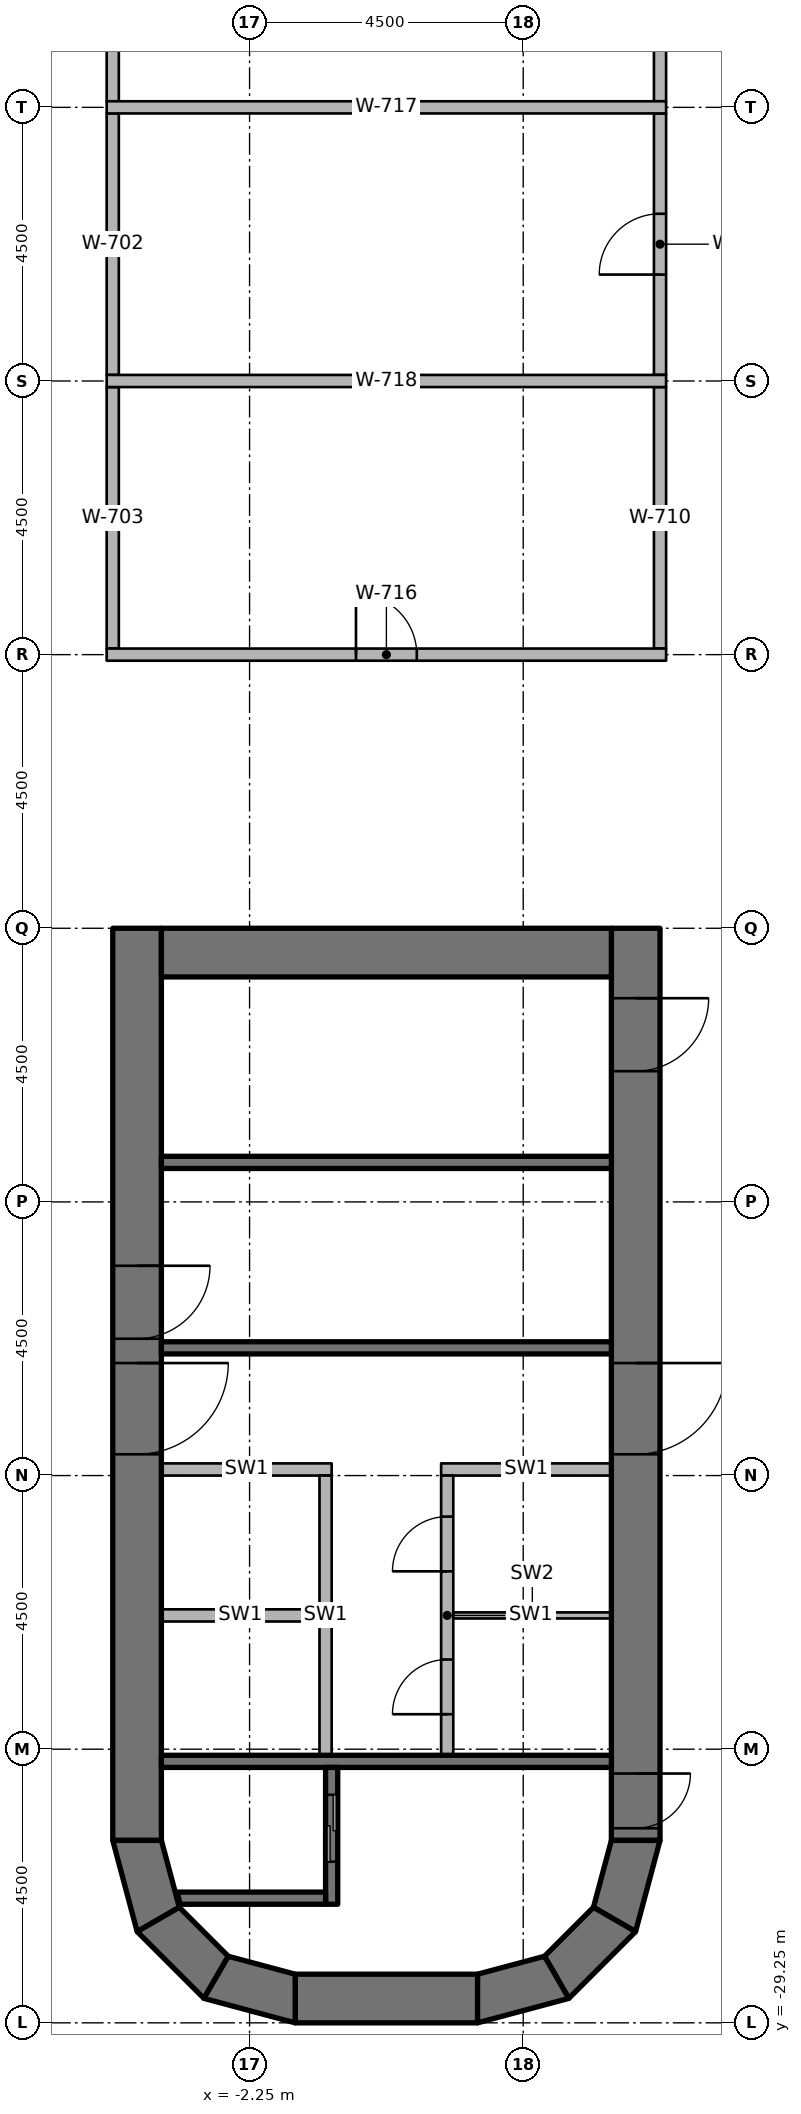
"""IFC4 building model, lengths in metres.
Left out: names, types, materials, properties, quantities, classifications, styles, units other than length and angle.
Written with IfcOpenShell. Run it as: python <this file> out.ifc"""

import sys

from ifc_helpers import new_model, si_unit, direction, frame, frame_2d, origin, place, context, subcontext, project, spatial, polyline, rectangle, outline, extrude, element, fill, save


model = new_model("IFC4")
c1 = context("Model", 3, precision=1e-05, world=origin(), true_north=direction((0.0, 1.0)))
c2 = subcontext(c1, "Body", "Model", "MODEL_VIEW")
j1 = project(units=[si_unit("LENGTHUNIT", "METRE"), si_unit("PLANEANGLEUNIT", "RADIAN")], contexts=[c1])
p1 = place(None, origin())
s1 = spatial("IfcSite", under=j1, at=p1, CompositionType="ELEMENT")
p2 = place(p1, origin())
s2 = spatial("IfcBuilding", under=s1, at=p2, CompositionType="ELEMENT")
p3 = place(p2, frame((0.0, 0.0, 94.2)))
s3 = spatial("IfcBuildingStorey", under=s2, at=p3, CompositionType="ELEMENT", Elevation=94.2)
p4 = place(p3, frame((-4.1, -11.25, 0.0), z_axis=(0.0, 0.0, 1.0), x_axis=(0.0, -1.0, 0.0)))
e1 = element("IfcWall", 1, at=p4, inside=s3, PredefinedType="SHEAR", context=c2, shape_type="SweptSolid", body=[
    extrude(rectangle(XDim=15.0, YDim=0.8, at=frame_2d((7.5, 0.0))), origin(), (0.0, 0.0, 1.0), 3.8),
])
p5 = place(p4, frame((7.15, 0.0, 0.0)))
e2 = element("IfcOpeningElement", 2, at=p5, cuts=e1, PredefinedType="OPENING", context=c2, shape_type="SweptSolid", body=[
    extrude(rectangle(XDim=1.5, YDim=2.3, at=frame_2d((0.75, 1.15))), frame((0.0, 0.41, 0.0), z_axis=(0.0, -1.0, 0.0), x_axis=(1.0, 0.0, 0.0)), (0.0, 0.0, 1.0), 0.82),
])
p6 = place(p4, frame((5.55, 0.0, 0.0)))
e3 = element("IfcOpeningElement", 3, at=p6, cuts=e1, PredefinedType="OPENING", context=c2, shape_type="SweptSolid", body=[
    extrude(rectangle(XDim=1.2, YDim=2.1, at=frame_2d((0.6, 1.05))), frame((0.0, 0.41, 0.0), z_axis=(0.0, -1.0, 0.0), x_axis=(1.0, 0.0, 0.0)), (0.0, 0.0, 1.0), 0.82),
])
p7 = place(p3, frame((4.1, -11.25, 0.0), z_axis=(0.0, 0.0, 1.0), x_axis=(0.0, -1.0, 0.0)))
e4 = element("IfcWall", 4, at=p7, inside=s3, PredefinedType="SHEAR", context=c2, shape_type="SweptSolid", body=[
    extrude(rectangle(XDim=15.0, YDim=0.8, at=frame_2d((7.5, 0.0))), origin(), (0.0, 0.0, 1.0), 3.8),
])
p8 = place(p7, frame((7.15, 0.0, 0.0)))
e5 = element("IfcOpeningElement", 5, at=p8, cuts=e4, PredefinedType="OPENING", context=c2, shape_type="SweptSolid", body=[
    extrude(rectangle(XDim=1.5, YDim=2.3, at=frame_2d((0.75, 1.15))), frame((0.0, 0.41, 0.0), z_axis=(0.0, -1.0, 0.0), x_axis=(1.0, 0.0, 0.0)), (0.0, 0.0, 1.0), 0.82),
])
p9 = place(p7, frame((13.9, 0.0, 0.0)))
e6 = element("IfcOpeningElement", 6, at=p9, cuts=e4, PredefinedType="OPENING", context=c2, shape_type="SweptSolid", body=[
    extrude(rectangle(XDim=0.9, YDim=2.1, at=frame_2d((0.45, 1.05))), frame((0.0, 0.41, 0.0), z_axis=(0.0, -1.0, 0.0), x_axis=(1.0, 0.0, 0.0)), (0.0, 0.0, 1.0), 0.82),
])
p10 = place(p7, frame((1.15, 0.0, 0.0)))
e7 = element("IfcOpeningElement", 7, at=p10, cuts=e4, PredefinedType="OPENING", context=c2, shape_type="SweptSolid", body=[
    extrude(rectangle(XDim=1.2, YDim=2.1, at=frame_2d((0.6, 1.05))), frame((0.0, 0.41, 0.0), z_axis=(0.0, -1.0, 0.0), x_axis=(1.0, 0.0, 0.0)), (0.0, 0.0, 1.0), 0.82),
])
p11 = place(p3, frame((-3.7, -11.65, 0.0), z_axis=(0.0, 0.0, 1.0), x_axis=(1.0, 0.0, 0.0)))
e8 = element("IfcWall", 8, at=p11, inside=s3, PredefinedType="SHEAR", context=c2, shape_type="SweptSolid", body=[
    extrude(rectangle(XDim=7.4, YDim=0.8, at=frame_2d((3.7, 0.0))), origin(), (0.0, 0.0, 1.0), 3.8),
])
p12 = place(p3, frame((-1.5, -28.85, 0.0), z_axis=(0.0, 0.0, 1.0), x_axis=(1.0, 0.0, 0.0)))
e9 = element("IfcWall", 9, at=p12, inside=s3, PredefinedType="SHEAR", context=c2, shape_type="SweptSolid", body=[
    extrude(rectangle(XDim=3.0, YDim=0.8, at=frame_2d((1.5, 0.0))), origin(), (0.0, 0.0, 1.0), 3.8),
])
p13 = place(p3, origin())
e10 = element("IfcWall", 10, at=p13, inside=s3, PredefinedType="SHEAR", context=c2, shape_type="SweptSolid", body=[
    extrude(outline(polyline([(-4.5, -26.25), (-4.098, -27.75), (-3.405, -27.35), (-3.7, -26.25), (-4.5, -26.25)])), origin(), (0.0, 0.0, 1.0), 3.8),
])
p14 = place(p3, origin())
e11 = element("IfcWall", 11, at=p14, inside=s3, PredefinedType="SHEAR", context=c2, shape_type="SweptSolid", body=[
    extrude(outline(polyline([(-4.098, -27.75), (-3.0, -28.848), (-2.6, -28.155), (-3.405, -27.35), (-4.098, -27.75)])), origin(), (0.0, 0.0, 1.0), 3.8),
])
p15 = place(p3, origin())
e12 = element("IfcWall", 12, at=p15, inside=s3, PredefinedType="SHEAR", context=c2, shape_type="SweptSolid", body=[
    extrude(outline(polyline([(-3.0, -28.848), (-1.5, -29.25), (-1.5, -28.45), (-2.6, -28.155), (-3.0, -28.848)])), origin(), (0.0, 0.0, 1.0), 3.8),
])
p16 = place(p3, origin())
e13 = element("IfcWall", 13, at=p16, inside=s3, PredefinedType="SHEAR", context=c2, shape_type="SweptSolid", body=[
    extrude(outline(polyline([(4.5, -26.25), (4.098, -27.75), (3.405, -27.35), (3.7, -26.25), (4.5, -26.25)])), origin(), (0.0, 0.0, 1.0), 3.8),
])
p17 = place(p3, origin())
e14 = element("IfcWall", 14, at=p17, inside=s3, PredefinedType="SHEAR", context=c2, shape_type="SweptSolid", body=[
    extrude(outline(polyline([(4.098, -27.75), (3.0, -28.848), (2.6, -28.155), (3.405, -27.35), (4.098, -27.75)])), origin(), (0.0, 0.0, 1.0), 3.8),
])
p18 = place(p3, origin())
e15 = element("IfcWall", 15, at=p18, inside=s3, PredefinedType="SHEAR", context=c2, shape_type="SweptSolid", body=[
    extrude(outline(polyline([(3.0, -28.848), (1.5, -29.25), (1.5, -28.45), (2.6, -28.155), (3.0, -28.848)])), origin(), (0.0, 0.0, 1.0), 3.8),
])
p19 = place(p3, frame((3.7, -24.95, 0.0), z_axis=(0.0, 0.0, 1.0), x_axis=(-1.0, 0.0, 0.0)))
e16 = element("IfcWall", 16, at=p19, inside=s3, PredefinedType="SHEAR", context=c2, shape_type="SweptSolid", body=[
    extrude(rectangle(XDim=7.4, YDim=0.2, at=frame_2d((3.7, 0.0))), origin(), (0.0, 0.0, 1.0), 3.65),
])
p20 = place(p3, frame((-0.9, -27.3, 0.0), z_axis=(0.0, 0.0, 1.0), x_axis=(0.0, 1.0, 0.0)))
e17 = element("IfcWall", 17, at=p20, inside=s3, PredefinedType="SHEAR", context=c2, shape_type="SweptSolid", body=[
    extrude(rectangle(XDim=2.25, YDim=0.2, at=frame_2d((1.125, 0.0))), origin(), (0.0, 0.0, 1.0), 3.65),
])
p21 = place(p20, frame((0.7, 0.0, 0.0)))
e18 = element("IfcOpeningElement", 18, at=p21, cuts=e17, PredefinedType="OPENING", context=c2, shape_type="SweptSolid", body=[
    extrude(rectangle(XDim=1.1, YDim=2.3, at=frame_2d((0.55, 1.15))), frame((0.0, 0.11, 0.0), z_axis=(0.0, -1.0, 0.0), x_axis=(1.0, 0.0, 0.0)), (0.0, 0.0, 1.0), 0.22),
])
p22 = place(p3, origin())
e19 = element("IfcWall", 19, at=p22, inside=s3, PredefinedType="SHEAR", context=c2, shape_type="SweptSolid", body=[
    extrude(outline(polyline([(-1.0, -27.1), (-3.444, -27.1), (-3.39, -27.3), (-1.0, -27.3), (-1.0, -27.1)])), origin(), (0.0, 0.0, 1.0), 3.65),
])
for number, where, z_axis, x_axis in (
    (20, (3.7, -18.15, 0.0), (0.0, 0.0, 1.0), (-1.0, 0.0, 0.0)),
    (21, (3.7, -15.1, 0.0), (0.0, 0.0, 1.0), (-1.0, 0.0, 0.0)),
):
    element("IfcWall", number, at=place(p3, frame(where, z_axis=z_axis, x_axis=x_axis)), inside=s3, PredefinedType="SHEAR", context=c2, shape_type="SweptSolid", body=[
        extrude(rectangle(XDim=7.4, YDim=0.2, at=frame_2d((3.7, 0.0))), origin(), (0.0, 0.0, 1.0), 3.65),
    ])
p23 = place(p3, frame((3.7, -20.15, 0.0), z_axis=(0.0, 0.0, 1.0), x_axis=(-1.0, 0.0, 0.0)))
e22 = element("IfcWall", 22, at=p23, inside=s3, PredefinedType="PARTITIONING", context=c2, shape_type="SweptSolid", body=[
    extrude(rectangle(XDim=2.8, YDim=0.2, at=frame_2d((1.4, 0.0))), origin(), (0.0, 0.0, 1.0), 3.65),
])
p24 = place(p3, frame((1.0, -24.85, 0.0), z_axis=(0.0, 0.0, 1.0), x_axis=(0.0, 1.0, 0.0)))
e23 = element("IfcWall", 23, at=p24, inside=s3, PredefinedType="PARTITIONING", context=c2, shape_type="SweptSolid", body=[
    extrude(rectangle(XDim=4.6, YDim=0.2, at=frame_2d((2.3, 0.0))), origin(), (0.0, 0.0, 1.0), 3.65),
])
p25 = place(p24, frame((0.675, 0.0, 0.0)))
e24 = element("IfcOpeningElement", 24, at=p25, cuts=e23, PredefinedType="OPENING", context=c2, shape_type="SweptSolid", body=[
    extrude(rectangle(XDim=0.9, YDim=2.1, at=frame_2d((0.45, 1.05))), frame((0.0, 0.11, 0.0), z_axis=(0.0, -1.0, 0.0), x_axis=(1.0, 0.0, 0.0)), (0.0, 0.0, 1.0), 0.22),
])
p26 = place(p24, frame((3.025, 0.0, 0.0)))
e25 = element("IfcOpeningElement", 25, at=p26, cuts=e23, PredefinedType="OPENING", context=c2, shape_type="SweptSolid", body=[
    extrude(rectangle(XDim=0.9, YDim=2.1, at=frame_2d((0.45, 1.05))), frame((0.0, 0.11, 0.0), z_axis=(0.0, -1.0, 0.0), x_axis=(1.0, 0.0, 0.0)), (0.0, 0.0, 1.0), 0.22),
])
p27 = place(p3, frame((-0.9, -20.15, 0.0), z_axis=(0.0, 0.0, 1.0), x_axis=(-1.0, 0.0, 0.0)))
e26 = element("IfcWall", 26, at=p27, inside=s3, PredefinedType="PARTITIONING", context=c2, shape_type="SweptSolid", body=[
    extrude(rectangle(XDim=2.8, YDim=0.2, at=frame_2d((1.4, 0.0))), origin(), (0.0, 0.0, 1.0), 3.65),
])
p28 = place(p3, frame((-1.0, -24.85, 0.0), z_axis=(0.0, 0.0, 1.0), x_axis=(0.0, 1.0, 0.0)))
e27 = element("IfcWall", 27, at=p28, inside=s3, PredefinedType="PARTITIONING", context=c2, shape_type="SweptSolid", body=[
    extrude(rectangle(XDim=4.6, YDim=0.2, at=frame_2d((2.3, 0.0))), origin(), (0.0, 0.0, 1.0), 3.65),
])
p29 = place(p3, frame((3.7, -22.55, 0.0), z_axis=(0.0, 0.0, 1.0), x_axis=(-1.0, 0.0, 0.0)))
e28 = element("IfcWall", 28, at=p29, inside=s3, PredefinedType="PARTITIONING", context=c2, shape_type="SweptSolid", body=[
    extrude(rectangle(XDim=2.6, YDim=0.1, at=frame_2d((1.3, 0.0))), origin(), (0.0, 0.0, 1.0), 3.65),
])
p30 = place(p3, frame((-1.1, -22.55, 0.0), z_axis=(0.0, 0.0, 1.0), x_axis=(-1.0, 0.0, 0.0)))
e29 = element("IfcWall", 29, at=p30, inside=s3, PredefinedType="PARTITIONING", context=c2, shape_type="SweptSolid", body=[
    extrude(rectangle(XDim=2.6, YDim=0.2, at=frame_2d((1.3, 0.0))), origin(), (0.0, 0.0, 1.0), 3.65),
])
for number, where, z_axis, x_axis in (
    (30, (-4.5, 2.35, 0.0), (0.0, 0.0, 1.0), (0.0, 1.0, 0.0)),
    (31, (-4.5, -2.15, 0.0), (0.0, 0.0, 1.0), (0.0, 1.0, 0.0)),
    (32, (-4.5, -6.65, 0.0), (0.0, 0.0, 1.0), (0.0, 1.0, 0.0)),
    (33, (4.5, 2.35, 0.0), (0.0, 0.0, 1.0), (0.0, 1.0, 0.0)),
):
    element("IfcWall", number, at=place(p3, frame(where, z_axis=z_axis, x_axis=x_axis)), inside=s3, PredefinedType="PARTITIONING", context=c2, shape_type="SweptSolid", body=[
        extrude(rectangle(XDim=4.3, YDim=0.2, at=frame_2d((2.15, 0.0))), origin(), (0.0, 0.0, 1.0), 2.738),
    ])
p31 = place(p3, frame((4.5, -2.15, 0.0), z_axis=(0.0, 0.0, 1.0), x_axis=(0.0, 1.0, 0.0)))
e34 = element("IfcWall", 34, at=p31, inside=s3, PredefinedType="PARTITIONING", context=c2, shape_type="SweptSolid", body=[
    extrude(rectangle(XDim=4.3, YDim=0.2, at=frame_2d((2.15, 0.0))), origin(), (0.0, 0.0, 1.0), 2.738),
])
p32 = place(p31, frame((1.65, 0.0, 0.0)))
e35 = element("IfcOpeningElement", 35, at=p32, cuts=e34, PredefinedType="OPENING", context=c2, shape_type="SweptSolid", body=[
    extrude(rectangle(XDim=1.0, YDim=2.1, at=frame_2d((0.5, 1.05))), frame((0.0, 0.11, 0.0), z_axis=(0.0, -1.0, 0.0), x_axis=(1.0, 0.0, 0.0)), (0.0, 0.0, 1.0), 0.22),
])
p33 = place(p3, frame((4.5, -6.65, 0.0), z_axis=(0.0, 0.0, 1.0), x_axis=(0.0, 1.0, 0.0)))
e36 = element("IfcWall", 36, at=p33, inside=s3, PredefinedType="PARTITIONING", context=c2, shape_type="SweptSolid", body=[
    extrude(rectangle(XDim=4.3, YDim=0.2, at=frame_2d((2.15, 0.0))), origin(), (0.0, 0.0, 1.0), 2.738),
])
p34 = place(p3, frame((-4.6, -6.75, 0.0), z_axis=(0.0, 0.0, 1.0), x_axis=(1.0, 0.0, 0.0)))
e37 = element("IfcWall", 37, at=p34, inside=s3, PredefinedType="PARTITIONING", context=c2, shape_type="SweptSolid", body=[
    extrude(rectangle(XDim=9.2, YDim=0.2, at=frame_2d((4.6, 0.0))), origin(), (0.0, 0.0, 1.0), 2.738),
])
p35 = place(p34, frame((4.1, 0.0, 0.0)))
e38 = element("IfcOpeningElement", 38, at=p35, cuts=e37, PredefinedType="OPENING", context=c2, shape_type="SweptSolid", body=[
    extrude(rectangle(XDim=1.0, YDim=2.1, at=frame_2d((0.5, 1.05))), frame((0.0, 0.11, 0.0), z_axis=(0.0, -1.0, 0.0), x_axis=(1.0, 0.0, 0.0)), (0.0, 0.0, 1.0), 0.22),
])
for number, where, z_axis, x_axis in (
    (39, (-4.6, 2.25, 0.0), (0.0, 0.0, 1.0), (1.0, 0.0, 0.0)),
    (40, (-4.6, -2.25, 0.0), (0.0, 0.0, 1.0), (1.0, 0.0, 0.0)),
):
    element("IfcWall", number, at=place(p3, frame(where, z_axis=z_axis, x_axis=x_axis)), inside=s3, PredefinedType="PARTITIONING", context=c2, shape_type="SweptSolid", body=[
        extrude(rectangle(XDim=9.2, YDim=0.2, at=frame_2d((4.6, 0.0))), origin(), (0.0, 0.0, 1.0), 2.738),
    ])
p36 = place(p8, origin())
e41 = element("IfcDoor", 41, at=p36, inside=s3, OperationType="DOUBLE_DOOR_SINGLE_SWING", PredefinedType="DOOR", context=c2, shape_type="SweptSolid", body=[
    extrude(rectangle(XDim=1.5, YDim=2.3, at=frame_2d((0.75, 1.15))), frame((0.0, 0.025, 0.0), z_axis=(0.0, -1.0, 0.0), x_axis=(1.0, 0.0, 0.0)), (0.0, 0.0, 1.0), 0.05),
])
fill(e5, e41)
p37 = place(p5, origin())
e42 = element("IfcDoor", 42, at=p37, inside=s3, OperationType="DOUBLE_DOOR_SINGLE_SWING", PredefinedType="DOOR", context=c2, shape_type="SweptSolid", body=[
    extrude(rectangle(XDim=1.5, YDim=2.3, at=frame_2d((0.75, 1.15))), frame((0.0, 0.025, 0.0), z_axis=(0.0, -1.0, 0.0), x_axis=(1.0, 0.0, 0.0)), (0.0, 0.0, 1.0), 0.05),
])
fill(e2, e42)
p38 = place(p9, origin())
e43 = element("IfcDoor", 43, at=p38, inside=s3, OperationType="SINGLE_SWING_RIGHT", PredefinedType="DOOR", context=c2, shape_type="SweptSolid", body=[
    extrude(rectangle(XDim=0.9, YDim=2.1, at=frame_2d((0.45, 1.05))), frame((0.0, 0.025, 0.0), z_axis=(0.0, -1.0, 0.0), x_axis=(1.0, 0.0, 0.0)), (0.0, 0.0, 1.0), 0.05),
])
fill(e6, e43)
p39 = place(p6, origin())
e44 = element("IfcDoor", 44, at=p39, inside=s3, OperationType="SINGLE_SWING_LEFT", PredefinedType="DOOR", context=c2, shape_type="SweptSolid", body=[
    extrude(rectangle(XDim=1.2, YDim=2.1, at=frame_2d((0.6, 1.05))), frame((0.0, 0.025, 0.0), z_axis=(0.0, -1.0, 0.0), x_axis=(1.0, 0.0, 0.0)), (0.0, 0.0, 1.0), 0.05),
])
fill(e3, e44)
p40 = place(p10, origin())
e45 = element("IfcDoor", 45, at=p40, inside=s3, OperationType="SINGLE_SWING_LEFT", PredefinedType="DOOR", context=c2, shape_type="SweptSolid", body=[
    extrude(rectangle(XDim=1.2, YDim=2.1, at=frame_2d((0.6, 1.05))), frame((0.0, 0.025, 0.0), z_axis=(0.0, -1.0, 0.0), x_axis=(1.0, 0.0, 0.0)), (0.0, 0.0, 1.0), 0.05),
])
fill(e7, e45)
p41 = place(p21, origin())
e46 = element("IfcDoor", 46, at=p41, inside=s3, OperationType="DOUBLE_DOOR_SLIDING", PredefinedType="DOOR", context=c2, shape_type="SweptSolid", body=[
    extrude(rectangle(XDim=1.1, YDim=2.3, at=frame_2d((0.55, 1.15))), frame((0.0, 0.025, 0.0), z_axis=(0.0, -1.0, 0.0), x_axis=(1.0, 0.0, 0.0)), (0.0, 0.0, 1.0), 0.05),
])
fill(e18, e46)
p42 = place(p25, origin())
e47 = element("IfcDoor", 47, at=p42, inside=s3, OperationType="SINGLE_SWING_RIGHT", PredefinedType="DOOR", context=c2, shape_type="SweptSolid", body=[
    extrude(rectangle(XDim=0.9, YDim=2.1, at=frame_2d((0.45, 1.05))), frame((0.0, 0.025, 0.0), z_axis=(0.0, -1.0, 0.0), x_axis=(1.0, 0.0, 0.0)), (0.0, 0.0, 1.0), 0.05),
])
fill(e24, e47)
p43 = place(p26, origin())
e48 = element("IfcDoor", 48, at=p43, inside=s3, OperationType="SINGLE_SWING_RIGHT", PredefinedType="DOOR", context=c2, shape_type="SweptSolid", body=[
    extrude(rectangle(XDim=0.9, YDim=2.1, at=frame_2d((0.45, 1.05))), frame((0.0, 0.025, 0.0), z_axis=(0.0, -1.0, 0.0), x_axis=(1.0, 0.0, 0.0)), (0.0, 0.0, 1.0), 0.05),
])
fill(e25, e48)
p44 = place(p32, origin())
e49 = element("IfcDoor", 49, at=p44, inside=s3, OperationType="SINGLE_SWING_RIGHT", PredefinedType="DOOR", context=c2, shape_type="SweptSolid", body=[
    extrude(rectangle(XDim=1.0, YDim=2.1, at=frame_2d((0.5, 1.05))), frame((0.0, 0.025, 0.0), z_axis=(0.0, -1.0, 0.0), x_axis=(1.0, 0.0, 0.0)), (0.0, 0.0, 1.0), 0.05),
])
fill(e35, e49)
p45 = place(p35, origin())
e50 = element("IfcDoor", 50, at=p45, inside=s3, OperationType="SINGLE_SWING_RIGHT", PredefinedType="DOOR", context=c2, shape_type="SweptSolid", body=[
    extrude(rectangle(XDim=1.0, YDim=2.1, at=frame_2d((0.5, 1.05))), frame((0.0, 0.025, 0.0), z_axis=(0.0, -1.0, 0.0), x_axis=(1.0, 0.0, 0.0)), (0.0, 0.0, 1.0), 0.05),
])
fill(e38, e50)
save(model, sys.argv[1])
